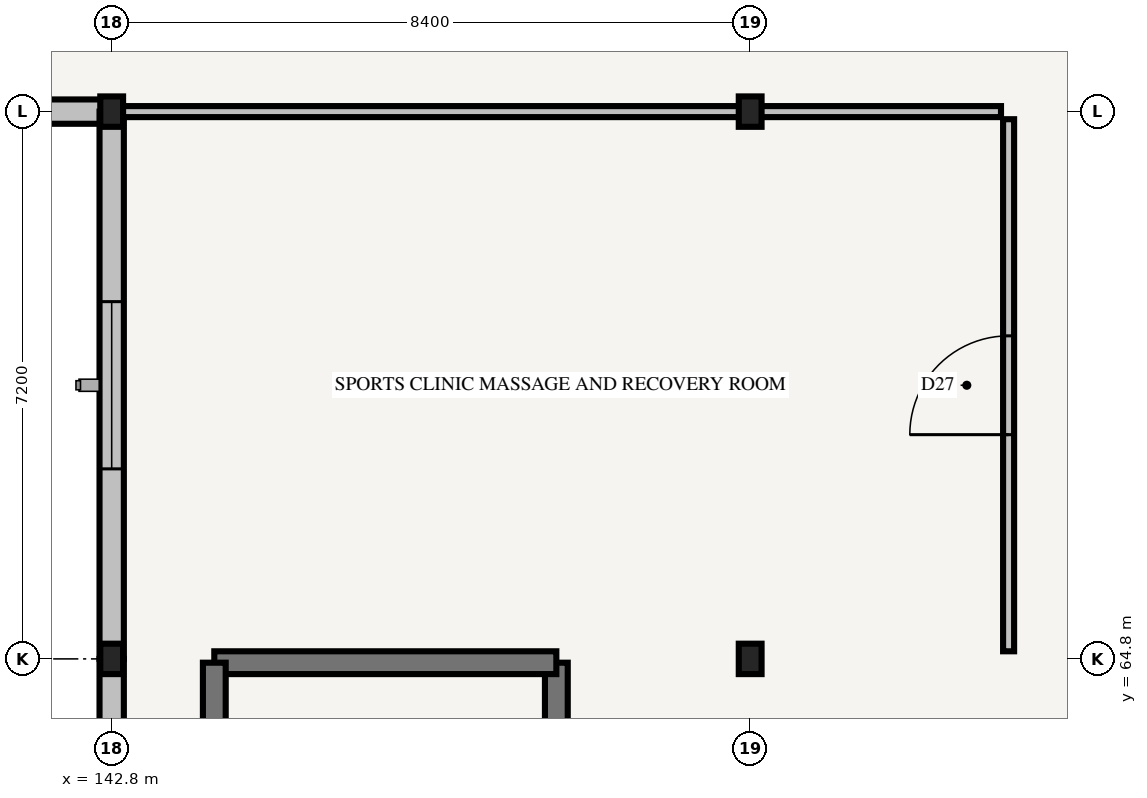
"""IFC4 building model, lengths in metres.
Left out: names, types, materials, properties, quantities, classifications, styles, units other than length and angle.
Written with IfcOpenShell. Run it as: python <this file> out.ifc"""

import sys

from ifc_helpers import new_model, si_unit, direction, frame, frame_2d, origin, origin_2d, place, context, subcontext, project, spatial, rectangle, i_section, extrude, element, fill, save


model = new_model("IFC4")
c1 = context("Model", 3, precision=1e-05, world=origin(), true_north=direction((0.0, 1.0)))
c2 = subcontext(c1, "Body", "Model", "MODEL_VIEW")
j1 = project(units=[si_unit("LENGTHUNIT", "METRE"), si_unit("PLANEANGLEUNIT", "RADIAN")], contexts=[c1])
p1 = place(None, origin())
s1 = spatial("IfcSite", under=j1, at=p1, CompositionType="ELEMENT")
p2 = place(p1, origin())
s2 = spatial("IfcBuilding", under=s1, at=p2, CompositionType="ELEMENT")
p3 = place(p2, frame((0.0, 0.0, 4.5)))
s3 = spatial("IfcBuildingStorey", under=s2, at=p3, CompositionType="ELEMENT", Elevation=4.5)
for number, where, z_axis, x_axis in (
    (1, (142.8, 64.8, 0.0), (0.0, 0.0, 1.0), (1.0, 0.0, 0.0)),
    (2, (142.8, 72.0, 0.0), (0.0, 0.0, 1.0), (1.0, 0.0, 0.0)),
    (3, (151.2, 64.8, 0.0), (0.0, 0.0, 1.0), (1.0, 0.0, 0.0)),
    (4, (151.2, 72.0, 0.0), (0.0, 0.0, 1.0), (1.0, 0.0, 0.0)),
):
    element("IfcColumn", number, at=place(p3, frame(where, z_axis=z_axis, x_axis=x_axis)), inside=s3, PredefinedType="COLUMN", context=c2, shape_type="SweptSolid", body=[
        extrude(i_section(OverallWidth=0.3, OverallDepth=0.4, WebThickness=0.013, FlangeThickness=0.024, FilletRadius=0.027, at=origin_2d()), origin(), (0.0, 0.0, 1.0), 4.2),
    ])
p4 = place(p3, frame((134.4, 72.0, 0.0), z_axis=(0.0, 0.0, 1.0), x_axis=(1.0, 0.0, 0.0)))
e5 = element("IfcWall", 5, at=p4, inside=s3, PredefinedType="STANDARD", context=c2, shape_type="SweptSolid", body=[
    extrude(rectangle(XDim=8.4, YDim=0.32, at=frame_2d((4.2, 0.0))), origin(), (0.0, 0.0, 1.0), 3.535),
])
p5 = place(p4, frame((3.3, 0.0, 0.85)))
e6 = element("IfcOpeningElement", 6, at=p5, cuts=e5, PredefinedType="OPENING", context=c2, shape_type="SweptSolid", body=[
    extrude(rectangle(XDim=1.8, YDim=1.8, at=frame_2d((0.9, 0.9))), frame((0.0, 0.185, 0.0), z_axis=(0.0, -1.0, 0.0), x_axis=(1.0, 0.0, 0.0)), (0.0, 0.0, 1.0), 0.37),
])
p6 = place(p3, frame((142.8, 72.0, 0.0), z_axis=(0.0, 0.0, 1.0), x_axis=(0.0, -1.0, 0.0)))
e7 = element("IfcWall", 7, at=p6, inside=s3, PredefinedType="STANDARD", context=c2, shape_type="SweptSolid", body=[
    extrude(rectangle(XDim=7.2, YDim=0.32, at=frame_2d((3.6, 0.0))), origin(), (0.0, 0.0, 1.0), 3.435),
])
p7 = place(p6, frame((2.5, 0.0, 0.85)))
e8 = element("IfcOpeningElement", 8, at=p7, cuts=e7, PredefinedType="OPENING", context=c2, shape_type="SweptSolid", body=[
    extrude(rectangle(XDim=2.2, YDim=1.55, at=frame_2d((1.1, 0.775))), frame((0.0, 0.185, 0.0), z_axis=(0.0, -1.0, 0.0), x_axis=(1.0, 0.0, 0.0)), (0.0, 0.0, 1.0), 0.37),
])
p8 = place(p3, frame((142.8, 64.8, 0.0), z_axis=(0.0, 0.0, 1.0), x_axis=(0.0, -1.0, 0.0)))
e9 = element("IfcWall", 9, at=p8, inside=s3, PredefinedType="STANDARD", context=c2, shape_type="SweptSolid", body=[
    extrude(rectangle(XDim=7.2, YDim=0.32, at=frame_2d((3.6, 0.0))), origin(), (0.0, 0.0, 1.0), 3.385),
])
p9 = place(p8, frame((2.55, 0.0, 0.85)))
e10 = element("IfcOpeningElement", 10, at=p9, cuts=e9, PredefinedType="OPENING", context=c2, shape_type="SweptSolid", body=[
    extrude(rectangle(XDim=2.1, YDim=1.45, at=frame_2d((1.05, 0.725))), frame((0.0, 0.185, 0.0), z_axis=(0.0, -1.0, 0.0), x_axis=(1.0, 0.0, 0.0)), (0.0, 0.0, 1.0), 0.37),
])
p10 = place(p3, frame((148.65, 57.65, 0.0), z_axis=(0.0, 0.0, 1.0), x_axis=(0.0, 1.0, 0.0)))
e11 = element("IfcWall", 11, at=p10, inside=s3, PredefinedType="SHEAR", context=c2, shape_type="SweptSolid", body=[
    extrude(rectangle(XDim=7.1, YDim=0.3, at=frame_2d((3.55, 0.0))), origin(), (0.0, 0.0, 1.0), 4.0),
])
p11 = place(p3, frame((148.65, 64.75, 0.0), z_axis=(0.0, 0.0, 1.0), x_axis=(-1.0, 0.0, 0.0)))
e12 = element("IfcWall", 12, at=p11, inside=s3, PredefinedType="SHEAR", context=c2, shape_type="SweptSolid", body=[
    extrude(rectangle(XDim=4.5, YDim=0.3, at=frame_2d((2.25, 0.0))), origin(), (0.0, 0.0, 1.0), 4.0),
])
p12 = place(p3, frame((144.15, 64.75, 0.0), z_axis=(0.0, 0.0, 1.0), x_axis=(0.0, -1.0, 0.0)))
e13 = element("IfcWall", 13, at=p12, inside=s3, PredefinedType="SHEAR", context=c2, shape_type="SweptSolid", body=[
    extrude(rectangle(XDim=7.1, YDim=0.3, at=frame_2d((3.55, 0.0))), origin(), (0.0, 0.0, 1.0), 4.0),
])
p13 = place(p3, frame((154.6, 64.9, 0.0), z_axis=(0.0, 0.0, 1.0), x_axis=(0.0, 1.0, 0.0)))
e14 = element("IfcWall", 14, at=p13, inside=s3, PredefinedType="PARTITIONING", context=c2, shape_type="SweptSolid", body=[
    extrude(rectangle(XDim=7.0, YDim=0.145, at=frame_2d((3.5, 0.0))), origin(), (0.0, 0.0, 1.0), 3.32),
])
p14 = place(p13, frame((2.85, 0.0, 0.0)))
e15 = element("IfcOpeningElement", 15, at=p14, cuts=e14, PredefinedType="OPENING", context=c2, shape_type="SweptSolid", body=[
    extrude(rectangle(XDim=1.3, YDim=2.15, at=frame_2d((0.65, 1.075))), frame((0.0, 0.097, 0.0), z_axis=(0.0, -1.0, 0.0), x_axis=(1.0, 0.0, 0.0)), (0.0, 0.0, 1.0), 0.195),
])
p15 = place(p3, frame((142.9, 72.0, 0.0), z_axis=(0.0, 0.0, 1.0), x_axis=(1.0, 0.0, 0.0)))
e16 = element("IfcWall", 16, at=p15, inside=s3, PredefinedType="PARTITIONING", context=c2, shape_type="SweptSolid", body=[
    extrude(rectangle(XDim=11.6, YDim=0.145, at=frame_2d((5.8, 0.0))), origin(), (0.0, 0.0, 1.0), 3.32),
])
p16 = place(p7, origin())
e17 = element("IfcWindow", 17, at=p16, inside=s3, PartitioningType="SINGLE_PANEL", PredefinedType="WINDOW", context=c2, shape_type="SweptSolid", body=[
    extrude(rectangle(XDim=2.2, YDim=1.55, at=frame_2d((1.1, 0.775))), frame((0.0, 0.03, 0.0), z_axis=(0.0, -1.0, 0.0), x_axis=(1.0, 0.0, 0.0)), (0.0, 0.0, 1.0), 0.06),
])
fill(e8, e17)
p17 = place(p14, frame((1.3, 0.0, 0.0), z_axis=(0.0, 0.0, 1.0), x_axis=(-1.0, 0.0, 0.0)))
e18 = element("IfcDoor", 18, at=p17, inside=s3, OperationType="SINGLE_SWING_LEFT", PredefinedType="DOOR", context=c2, shape_type="SweptSolid", body=[
    extrude(rectangle(XDim=1.3, YDim=2.15, at=frame_2d((0.65, 1.075))), frame((0.0, 0.025, 0.0), z_axis=(0.0, -1.0, 0.0), x_axis=(1.0, 0.0, 0.0)), (0.0, 0.0, 1.0), 0.05),
])
fill(e15, e18)
save(model, sys.argv[1])
